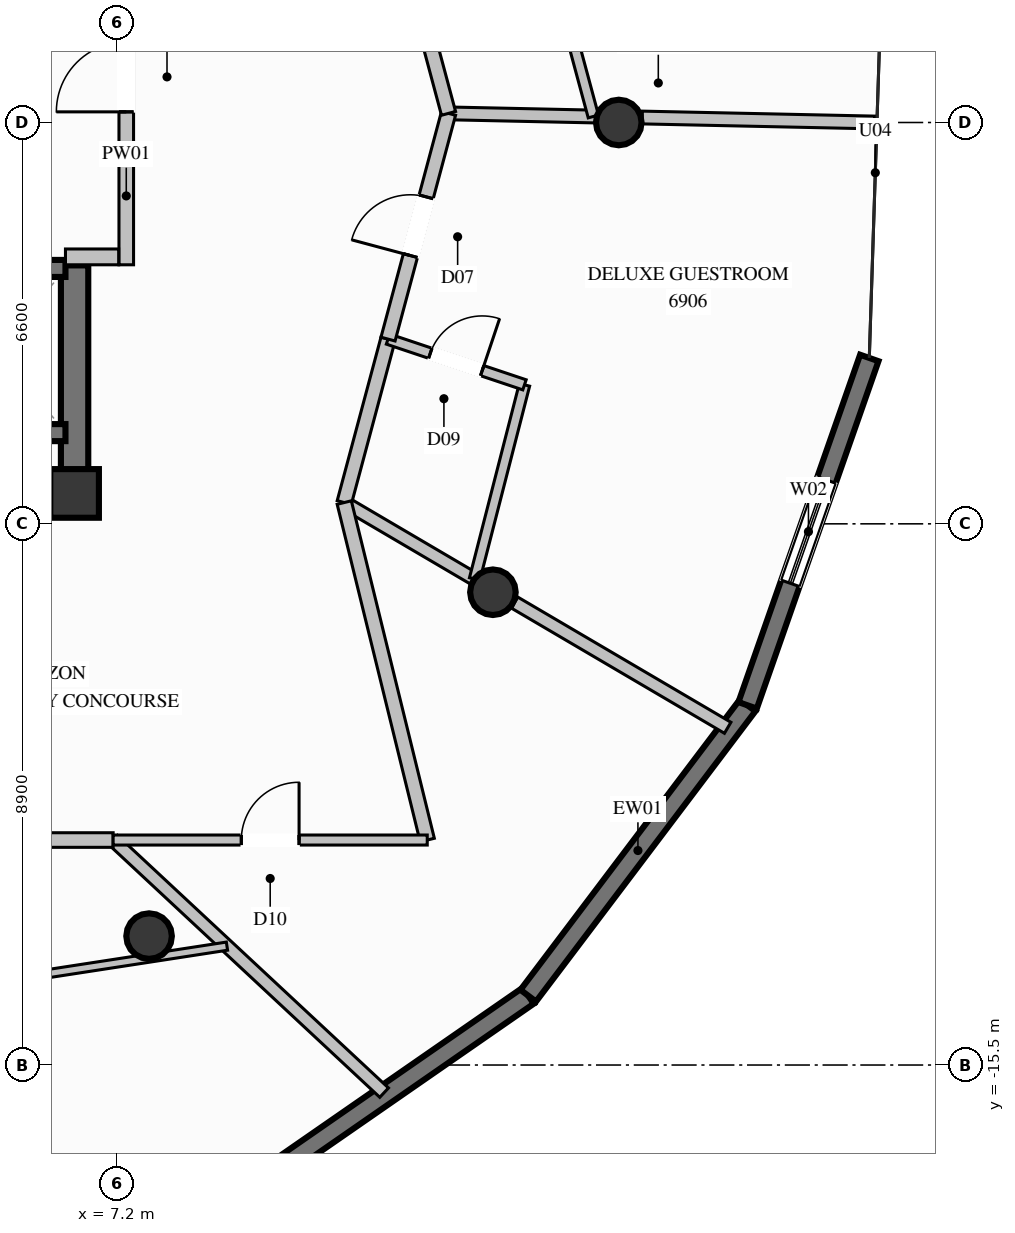
"""IFC4 building model, lengths in metres.
Left out: names, types, materials, properties, quantities, classifications, styles, units other than length and angle.
Written with IfcOpenShell. Run it as: python <this file> out.ifc"""

import sys

from ifc_helpers import new_model, si_unit, direction, frame, frame_2d, origin, origin_2d, place, context, subcontext, project, spatial, rectangle, circle, extrude, element, fill, save


model = new_model("IFC4")
c1 = context("Model", 3, precision=1e-05, world=origin(), true_north=direction((0.0, 1.0)))
c2 = subcontext(c1, "Body", "Model", "MODEL_VIEW")
j1 = project(units=[si_unit("LENGTHUNIT", "METRE"), si_unit("PLANEANGLEUNIT", "RADIAN")], contexts=[c1])
p1 = place(None, origin())
s1 = spatial("IfcSite", under=j1, at=p1, CompositionType="ELEMENT")
p2 = place(p1, origin())
s2 = spatial("IfcBuilding", under=s1, at=p2, CompositionType="ELEMENT")
p3 = place(p2, frame((0.0, 0.0, 258.2)))
s3 = spatial("IfcBuildingStorey", under=s2, at=p3, CompositionType="ELEMENT", Elevation=258.2)
p4 = place(p3, frame((6.5, -6.1, 0.0), z_axis=(0.0, 0.0, 1.0), x_axis=(1.0, 0.0, 0.0)))
e1 = element("IfcColumn", 1, at=p4, inside=s3, PredefinedType="COLUMN", context=c2, shape_type="SweptSolid", body=[
    extrude(rectangle(XDim=0.8, YDim=0.8, at=origin_2d()), origin(), (0.0, 0.0, 1.0), 3.8),
])
p5 = place(p3, frame((4.15, -6.1, 0.0), z_axis=(0.0, 0.0, 1.0), x_axis=(1.0, 0.0, 0.0)))
e2 = element("IfcWall", 2, at=p5, inside=s3, PredefinedType="SHEAR", context=c2, shape_type="SweptSolid", body=[
    extrude(rectangle(XDim=2.125, YDim=0.45, at=frame_2d((1.062, 0.0))), origin(), (0.0, 0.0, 1.0), 3.8),
])
p6 = place(p3, frame((6.5, -6.325, 0.0), z_axis=(0.0, 0.0, 1.0), x_axis=(0.0, 1.0, 0.0)))
e3 = element("IfcWall", 3, at=p6, inside=s3, PredefinedType="SHEAR", context=c2, shape_type="SweptSolid", body=[
    extrude(rectangle(XDim=3.975, YDim=0.45, at=frame_2d((1.987, 0.0))), origin(), (0.0, 0.0, 1.0), 3.8),
])
for number, where, z_axis, x_axis in (
    (4, (15.45, 0.0, 0.0), (0.0, 0.0, 1.0), (1.0, 0.0, 0.0)),
    (5, (7.725, -13.38, 0.0), (0.0, 0.0, 1.0), (1.0, 0.0, 0.0)),
    (6, (13.38, -7.725, 0.0), (0.0, 0.0, 1.0), (1.0, 0.0, 0.0)),
):
    element("IfcColumn", number, at=place(p3, frame(where, z_axis=z_axis, x_axis=x_axis)), inside=s3, PredefinedType="COLUMN", context=c2, shape_type="SweptSolid", body=[
        extrude(circle(Radius=0.375, at=origin_2d()), origin(), (0.0, 0.0, 1.0), 3.8),
    ])
p7 = place(p3, frame((13.961, -14.36, 0.0), z_axis=(0.0, 0.0, 1.0), x_axis=(-0.821952888389, -0.569555483925, 0.0)))
e7 = element("IfcWall", 7, at=p7, inside=s3, PredefinedType="SOLIDWALL", context=c2, shape_type="SweptSolid", body=[
    extrude(rectangle(XDim=5.915, YDim=0.32, at=frame_2d((2.958, 0.0))), origin(), (0.0, 0.0, 1.0), 3.57),
])
p8 = place(p3, frame((17.569, -9.585, 0.0), z_axis=(0.0, 0.0, 1.0), x_axis=(-0.602861364765, -0.797845959364, 0.0)))
e8 = element("IfcWall", 8, at=p8, inside=s3, PredefinedType="SOLIDWALL", context=c2, shape_type="SweptSolid", body=[
    extrude(rectangle(XDim=5.985, YDim=0.32, at=frame_2d((2.993, 0.0))), origin(), (0.0, 0.0, 1.0), 3.57),
])
p9 = place(p3, frame((19.57, -3.872, 0.0), z_axis=(0.0, 0.0, 1.0), x_axis=(-0.3305660024, -0.943782876544, 0.0)))
e9 = element("IfcWall", 9, at=p9, inside=s3, PredefinedType="SOLIDWALL", context=c2, shape_type="SweptSolid", body=[
    extrude(rectangle(XDim=6.053, YDim=0.32, at=frame_2d((3.027, 0.0))), origin(), (0.0, 0.0, 1.0), 3.57),
])
p10 = place(p9, frame((2.127, 0.0, 0.35)))
e10 = element("IfcOpeningElement", 10, at=p10, cuts=e9, PredefinedType="OPENING", context=c2, shape_type="SweptSolid", body=[
    extrude(rectangle(XDim=1.8, YDim=2.6, at=frame_2d((0.9, 1.3))), frame((0.0, 0.17, 0.0), z_axis=(0.0, -1.0, 0.0), x_axis=(1.0, 0.0, 0.0)), (0.0, 0.0, 1.0), 0.34),
])
p11 = place(p3, frame((4.15, -5.1, 0.0), z_axis=(0.0, 0.0, 1.0), x_axis=(1.0, 0.0, 0.0)))
e11 = element("IfcWall", 11, at=p11, inside=s3, PredefinedType="SOLIDWALL", context=c2, shape_type="SweptSolid", body=[
    extrude(rectangle(XDim=2.2, YDim=0.28, at=frame_2d((1.1, 0.0))), origin(), (0.0, 0.0, 1.0), 3.57),
])
p12 = place(p3, frame((6.35, -2.4, 0.0), z_axis=(0.0, 0.0, 1.0), x_axis=(-1.0, 0.0, 0.0)))
e12 = element("IfcWall", 12, at=p12, inside=s3, PredefinedType="SOLIDWALL", context=c2, shape_type="SweptSolid", body=[
    extrude(rectangle(XDim=2.2, YDim=0.28, at=frame_2d((1.1, 0.0))), origin(), (0.0, 0.0, 1.0), 3.57),
])
p13 = place(p12, frame((0.5, 0.0, 0.0)))
e13 = element("IfcOpeningElement", 13, at=p13, cuts=e12, PredefinedType="OPENING", context=c2, shape_type="SweptSolid", body=[
    extrude(rectangle(XDim=1.2, YDim=2.2, at=frame_2d((0.6, 1.1))), frame((0.0, 0.15, 0.0), z_axis=(0.0, -1.0, 0.0), x_axis=(1.0, 0.0, 0.0)), (0.0, 0.0, 1.0), 0.3),
])
p14 = place(p3, frame((7.35, -2.34, 0.0), z_axis=(0.0, 0.0, 1.0), x_axis=(0.0, 1.0, 0.0)))
e14 = element("IfcWall", 14, at=p14, inside=s3, PredefinedType="PARTITIONING", context=c2, shape_type="SweptSolid", body=[
    extrude(rectangle(XDim=5.02, YDim=0.24, at=frame_2d((2.51, 0.0))), origin(), (0.0, 0.0, 1.0), 2.655),
])
p15 = place(p14, frame((2.515, 0.0, 0.0)))
e15 = element("IfcOpeningElement", 15, at=p15, cuts=e14, PredefinedType="OPENING", context=c2, shape_type="SweptSolid", body=[
    extrude(rectangle(XDim=1.15, YDim=2.2, at=frame_2d((0.575, 1.1))), frame((0.0, 0.13, 0.0), z_axis=(0.0, -1.0, 0.0), x_axis=(1.0, 0.0, 0.0)), (0.0, 0.0, 1.0), 0.26),
])
p16 = place(p3, frame((6.35, -2.21, 0.0), z_axis=(0.0, 0.0, 1.0), x_axis=(1.0, 0.0, 0.0)))
e16 = element("IfcWall", 16, at=p16, inside=s3, PredefinedType="PARTITIONING", context=c2, shape_type="SweptSolid", body=[
    extrude(rectangle(XDim=0.875, YDim=0.26, at=frame_2d((0.438, 0.0))), origin(), (0.0, 0.0, 1.0), 3.57),
])
p17 = place(p3, frame((12.65, 0.15, 0.0), z_axis=(0.0, 0.0, 1.0), x_axis=(0.999768629451, -0.021510173543, 0.0)))
e17 = element("IfcWall", 17, at=p17, inside=s3, PredefinedType="PARTITIONING", context=c2, shape_type="SweptSolid", body=[
    extrude(rectangle(XDim=2.417, YDim=0.21, at=frame_2d((1.209, 0.0))), origin(), (0.0, 0.0, 1.0), 3.57),
])
p18 = place(p3, frame((15.836, 0.082, 0.0), z_axis=(0.0, 0.0, 1.0), x_axis=(0.999769518417, -0.021468815632, 0.0)))
e18 = element("IfcWall", 18, at=p18, inside=s3, PredefinedType="PARTITIONING", context=c2, shape_type="SweptSolid", body=[
    extrude(rectangle(XDim=3.821, YDim=0.21, at=frame_2d((1.911, 0.0))), origin(), (0.0, 0.0, 1.0), 3.57),
])
p19 = place(p3, frame((10.935, -6.25, 0.0), z_axis=(0.0, 0.0, 1.0), x_axis=(0.862250119525, -0.506482705903, 0.0)))
e19 = element("IfcWall", 19, at=p19, inside=s3, PredefinedType="PARTITIONING", context=c2, shape_type="SweptSolid", body=[
    extrude(rectangle(XDim=2.462, YDim=0.21, at=frame_2d((1.231, 0.0))), origin(), (0.0, 0.0, 1.0), 3.085),
])
p20 = place(p3, frame((13.736, -7.895, 0.0), z_axis=(0.0, 0.0, 1.0), x_axis=(0.862215081252, -0.506542351301, 0.0)))
e20 = element("IfcWall", 20, at=p20, inside=s3, PredefinedType="PARTITIONING", context=c2, shape_type="SweptSolid", body=[
    extrude(rectangle(XDim=4.065, YDim=0.21, at=frame_2d((2.032, 0.0))), origin(), (0.0, 0.0, 1.0), 3.57),
])
p21 = place(p3, frame((10.935, -6.25, 0.0), z_axis=(0.0, 0.0, 1.0), x_axis=(0.258727314432, 0.96595040078, 0.0)))
e21 = element("IfcWall", 21, at=p21, inside=s3, PredefinedType="PARTITIONING", context=c2, shape_type="SweptSolid", body=[
    extrude(rectangle(XDim=2.783, YDim=0.24, at=frame_2d((1.391, 0.0))), origin(), (0.0, 0.0, 1.0), 3.57),
])
p22 = place(p3, frame((13.079, -7.509, 0.0), z_axis=(0.0, 0.0, 1.0), x_axis=(0.248539172998, 0.968621845451, 0.0)))
e22 = element("IfcWall", 22, at=p22, inside=s3, PredefinedType="PLUMBINGWALL", context=c2, shape_type="SweptSolid", body=[
    extrude(rectangle(XDim=3.299, YDim=0.175, at=frame_2d((1.649, 0.0))), origin(), (0.0, 0.0, 1.0), 3.137),
])
p23 = place(p3, frame((11.655, -3.562, 0.0), z_axis=(0.0, 0.0, 1.0), x_axis=(0.948176584349, -0.317743866804, 0.0)))
e23 = element("IfcWall", 23, at=p23, inside=s3, PredefinedType="PLUMBINGWALL", context=c2, shape_type="SweptSolid", body=[
    extrude(rectangle(XDim=2.366, YDim=0.175, at=frame_2d((1.183, 0.0))), origin(), (0.0, 0.0, 1.0), 3.57),
])
p24 = place(p23, frame((0.733, 0.0, 0.0)))
e24 = element("IfcOpeningElement", 24, at=p24, cuts=e23, PredefinedType="OPENING", context=c2, shape_type="SweptSolid", body=[
    extrude(rectangle(XDim=0.9, YDim=2.1, at=frame_2d((0.45, 1.05))), frame((0.0, 0.098, 0.0), z_axis=(0.0, -1.0, 0.0), x_axis=(1.0, 0.0, 0.0)), (0.0, 0.0, 1.0), 0.195),
])
p25 = place(p3, frame((11.655, -3.562, 0.0), z_axis=(0.0, 0.0, 1.0), x_axis=(0.258884274469, 0.965908345772, 0.0)))
e25 = element("IfcWall", 25, at=p25, inside=s3, PredefinedType="PARTITIONING", context=c2, shape_type="SweptSolid", body=[
    extrude(rectangle(XDim=3.843, YDim=0.24, at=frame_2d((1.921, 0.0))), origin(), (0.0, 0.0, 1.0), 3.57),
])
p26 = place(p25, frame((1.422, 0.0, 0.0)))
e26 = element("IfcOpeningElement", 26, at=p26, cuts=e25, PredefinedType="OPENING", context=c2, shape_type="SweptSolid", body=[
    extrude(rectangle(XDim=1.0, YDim=2.2, at=frame_2d((0.5, 1.1))), frame((0.0, 0.13, 0.0), z_axis=(0.0, -1.0, 0.0), x_axis=(1.0, 0.0, 0.0)), (0.0, 0.0, 1.0), 0.26),
])
p27 = place(p3, frame((12.65, 0.15, 0.0), z_axis=(0.0, 0.0, 1.0), x_axis=(-0.258727314432, 0.96595040078, 0.0)))
e27 = element("IfcWall", 27, at=p27, inside=s3, PredefinedType="PARTITIONING", context=c2, shape_type="SweptSolid", body=[
    extrude(rectangle(XDim=2.783, YDim=0.24, at=frame_2d((1.391, 0.0))), origin(), (0.0, 0.0, 1.0), 3.57),
])
p28 = place(p3, frame((15.032, 0.099, 0.0), z_axis=(0.0, 0.0, 1.0), x_axis=(-0.260314282217, 0.965523937805, 0.0)))
e28 = element("IfcWall", 28, at=p28, inside=s3, PredefinedType="PLUMBINGWALL", context=c2, shape_type="SweptSolid", body=[
    extrude(rectangle(XDim=3.288, YDim=0.175, at=frame_2d((1.644, 0.0))), origin(), (0.0, 0.0, 1.0), 3.137),
])
p29 = place(p3, frame((7.134, -11.8, 0.0), z_axis=(0.0, 0.0, 1.0), x_axis=(0.731533464102, -0.681805537451, 0.0)))
e29 = element("IfcWall", 29, at=p29, inside=s3, PredefinedType="PARTITIONING", context=c2, shape_type="SweptSolid", body=[
    extrude(rectangle(XDim=6.093, YDim=0.21, at=frame_2d((3.046, 0.0))), origin(), (0.0, 0.0, 1.0), 2.449),
])
p30 = place(p3, frame((0.0, -11.8, 0.0), z_axis=(0.0, 0.0, 1.0), x_axis=(1.0, 0.0, 0.0)))
e30 = element("IfcWall", 30, at=p30, inside=s3, PredefinedType="PARTITIONING", context=c2, shape_type="SweptSolid", body=[
    extrude(rectangle(XDim=7.134, YDim=0.24, at=frame_2d((3.567, 0.0))), origin(), (0.0, 0.0, 1.0), 3.57),
])
p31 = place(p3, frame((0.169, -14.903, 0.0), z_axis=(0.0, 0.0, 1.0), x_axis=(0.988395361394, 0.151903290202, 0.0)))
e31 = element("IfcWall", 31, at=p31, inside=s3, PredefinedType="PARTITIONING", context=c2, shape_type="SweptSolid", body=[
    extrude(rectangle(XDim=8.941, YDim=0.135, at=frame_2d((4.47, 0.0))), origin(), (0.0, 0.0, 1.0), 3.137),
])
p32 = place(p31, frame((3.995, 0.0, 0.0)))
e32 = element("IfcOpeningElement", 32, at=p32, cuts=e31, PredefinedType="OPENING", context=c2, shape_type="SweptSolid", body=[
    extrude(rectangle(XDim=0.95, YDim=2.1, at=frame_2d((0.475, 1.05))), frame((0.0, 0.078, 0.0), z_axis=(0.0, -1.0, 0.0), x_axis=(1.0, 0.0, 0.0)), (0.0, 0.0, 1.0), 0.155),
])
p33 = place(p3, frame((12.3, -11.8, 0.0), z_axis=(0.0, 0.0, 1.0), x_axis=(-0.238825099749, 0.971062599285, 0.0)))
e33 = element("IfcWall", 33, at=p33, inside=s3, PredefinedType="PARTITIONING", context=c2, shape_type="SweptSolid", body=[
    extrude(rectangle(XDim=5.715, YDim=0.24, at=frame_2d((2.858, 0.0))), origin(), (0.0, 0.0, 1.0), 3.57),
])
p34 = place(p3, frame((7.134, -11.8, 0.0), z_axis=(0.0, 0.0, 1.0), x_axis=(1.0, 0.0, 0.0)))
e34 = element("IfcWall", 34, at=p34, inside=s3, PredefinedType="PARTITIONING", context=c2, shape_type="SweptSolid", body=[
    extrude(rectangle(XDim=5.166, YDim=0.165, at=frame_2d((2.583, 0.0))), origin(), (0.0, 0.0, 1.0), 3.57),
])
p35 = place(p34, frame((2.108, 0.0, 0.0)))
e35 = element("IfcOpeningElement", 35, at=p35, cuts=e34, PredefinedType="OPENING", context=c2, shape_type="SweptSolid", body=[
    extrude(rectangle(XDim=0.95, YDim=2.1, at=frame_2d((0.475, 1.05))), frame((0.0, 0.093, 0.0), z_axis=(0.0, -1.0, 0.0), x_axis=(1.0, 0.0, 0.0)), (0.0, 0.0, 1.0), 0.185),
])
p36 = place(p10, origin())
e36 = element("IfcWindow", 36, at=p36, inside=s3, PartitioningType="SINGLE_PANEL", PredefinedType="WINDOW", context=c2, shape_type="SweptSolid", body=[
    extrude(rectangle(XDim=1.8, YDim=2.6, at=frame_2d((0.9, 1.3))), frame((0.0, 0.03, 0.0), z_axis=(0.0, -1.0, 0.0), x_axis=(1.0, 0.0, 0.0)), (0.0, 0.0, 1.0), 0.06),
])
fill(e10, e36)
p37 = place(p15, origin())
e37 = element("IfcDoor", 37, at=p37, inside=s3, OperationType="SINGLE_SWING_LEFT", PredefinedType="DOOR", context=c2, shape_type="SweptSolid", body=[
    extrude(rectangle(XDim=1.15, YDim=2.2, at=frame_2d((0.575, 1.1))), frame((0.0, 0.025, 0.0), z_axis=(0.0, -1.0, 0.0), x_axis=(1.0, 0.0, 0.0)), (0.0, 0.0, 1.0), 0.05),
])
fill(e15, e37)
p38 = place(p24, origin())
e38 = element("IfcDoor", 38, at=p38, inside=s3, OperationType="SINGLE_SWING_RIGHT", PredefinedType="DOOR", context=c2, shape_type="SweptSolid", body=[
    extrude(rectangle(XDim=0.9, YDim=2.1, at=frame_2d((0.45, 1.05))), frame((0.0, 0.025, 0.0), z_axis=(0.0, -1.0, 0.0), x_axis=(1.0, 0.0, 0.0)), (0.0, 0.0, 1.0), 0.05),
])
fill(e24, e38)
p39 = place(p26, origin())
e39 = element("IfcDoor", 39, at=p39, inside=s3, OperationType="SINGLE_SWING_LEFT", PredefinedType="DOOR", context=c2, shape_type="SweptSolid", body=[
    extrude(rectangle(XDim=1.0, YDim=2.2, at=frame_2d((0.5, 1.1))), frame((0.0, 0.025, 0.0), z_axis=(0.0, -1.0, 0.0), x_axis=(1.0, 0.0, 0.0)), (0.0, 0.0, 1.0), 0.05),
])
fill(e26, e39)
p40 = place(p35, origin())
e40 = element("IfcDoor", 40, at=p40, inside=s3, OperationType="SINGLE_SWING_RIGHT", PredefinedType="DOOR", context=c2, shape_type="SweptSolid", body=[
    extrude(rectangle(XDim=0.95, YDim=2.1, at=frame_2d((0.475, 1.05))), frame((0.0, 0.025, 0.0), z_axis=(0.0, -1.0, 0.0), x_axis=(1.0, 0.0, 0.0)), (0.0, 0.0, 1.0), 0.05),
])
fill(e35, e40)
save(model, sys.argv[1])
